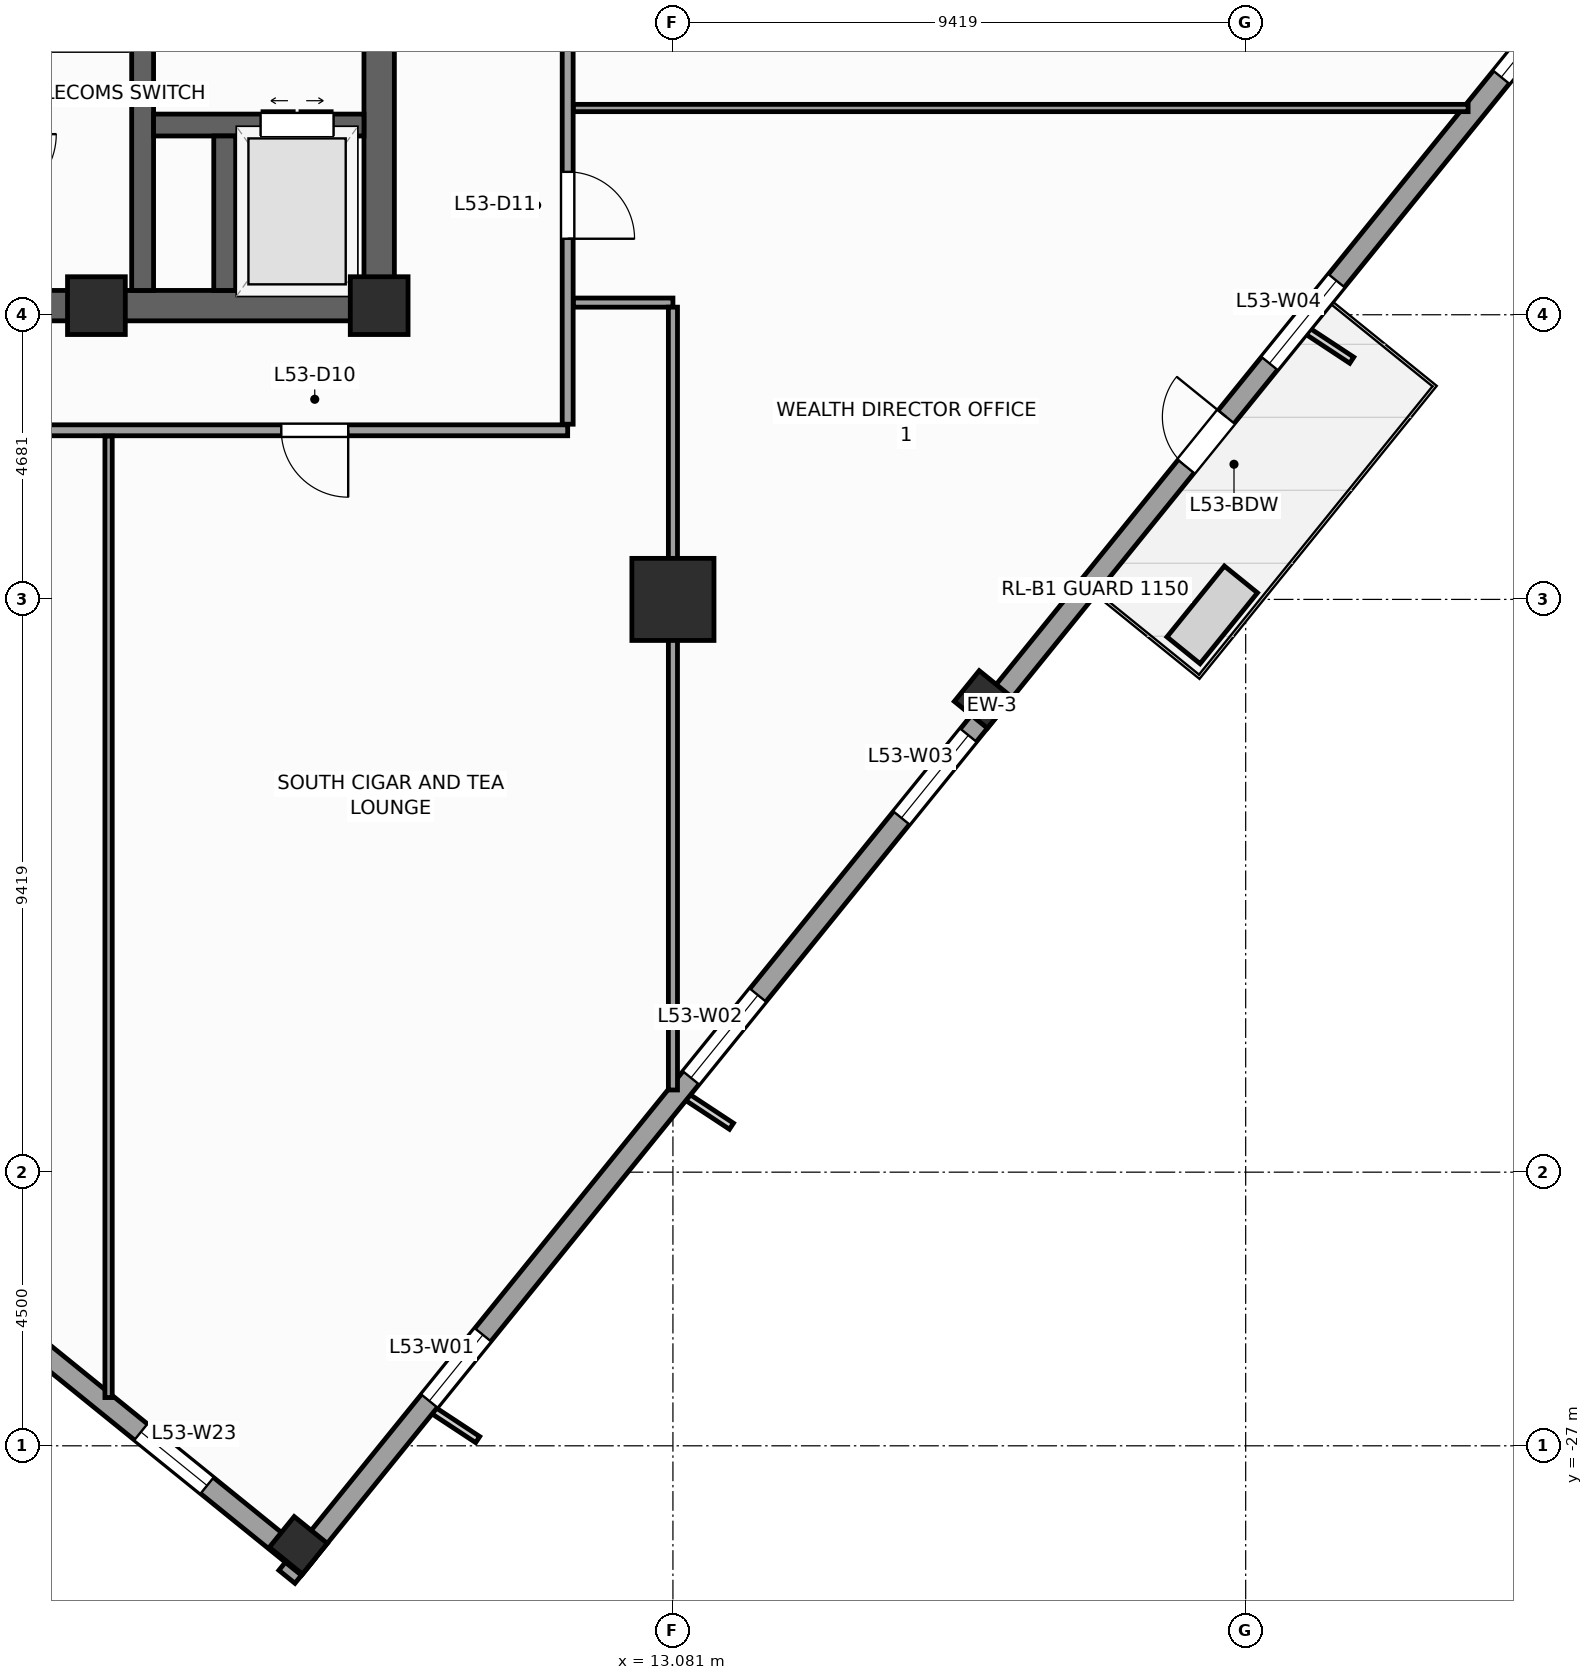
"""IFC4 building model, lengths in metres.
Left out: names, types, materials, properties, quantities, classifications, styles, units other than length and angle.
Written with IfcOpenShell. Run it as: python <this file> out.ifc"""

import sys

from ifc_helpers import new_model, si_unit, direction, frame, frame_2d, origin, origin_2d, place, context, subcontext, project, spatial, rectangle, extrude, source, transform, mapped, element, fill, save


model = new_model("IFC4")
c1 = context("Model", 3, precision=1e-05, world=origin(), true_north=direction((0.0, 1.0)))
c2 = subcontext(c1, "Body", "Model", "MODEL_VIEW")
j1 = project(units=[si_unit("LENGTHUNIT", "METRE"), si_unit("PLANEANGLEUNIT", "RADIAN")], contexts=[c1])
p1 = place(None, origin())
s1 = spatial("IfcSite", under=j1, at=p1, CompositionType="ELEMENT")
p2 = place(p1, origin())
s2 = spatial("IfcBuilding", under=s1, at=p2, CompositionType="ELEMENT")
p3 = place(p2, frame((0.0, 0.0, 221.2)))
s3 = spatial("IfcBuildingStorey", under=s2, at=p3, CompositionType="ELEMENT", Elevation=221.2)
p4 = place(p3, frame((-8.5, -8.25, 0.0), z_axis=(0.0, 0.0, 1.0), x_axis=(1.0, 0.0, 0.0)))
e1 = element("IfcWall", 1, at=p4, inside=s3, PredefinedType="SHEAR", context=c2, shape_type="SweptSolid", body=[
    extrude(rectangle(XDim=17.0, YDim=0.5, at=frame_2d((8.5, 0.0))), origin(), (0.0, 0.0, 1.0), 3.9),
])
p5 = place(p4, frame((7.85, 0.0, 0.0)))
e2 = element("IfcOpeningElement", 2, at=p5, cuts=e1, PredefinedType="OPENING", context=c2, shape_type="SweptSolid", body=[
    extrude(rectangle(XDim=1.3, YDim=2.2, at=frame_2d((0.65, 1.1))), frame((0.0, 0.26, 0.0), z_axis=(0.0, -1.0, 0.0), x_axis=(1.0, 0.0, 0.0)), (0.0, 0.0, 1.0), 0.52),
])
p6 = place(p3, frame((8.25, -8.0, 0.0), z_axis=(0.0, 0.0, 1.0), x_axis=(0.0, 1.0, 0.0)))
e3 = element("IfcWall", 3, at=p6, inside=s3, PredefinedType="SHEAR", context=c2, shape_type="SweptSolid", body=[
    extrude(rectangle(XDim=16.0, YDim=0.5, at=frame_2d((8.0, 0.0))), origin(), (0.0, 0.0, 1.0), 3.9),
])
p7 = place(p6, frame((4.69, 0.0, 0.0)))
e4 = element("IfcOpeningElement", 4, at=p7, cuts=e3, PredefinedType="OPENING", context=c2, shape_type="SweptSolid", body=[
    extrude(rectangle(XDim=1.3, YDim=2.2, at=frame_2d((0.65, 1.1))), frame((0.0, 0.26, 0.0), z_axis=(0.0, -1.0, 0.0), x_axis=(1.0, 0.0, 0.0)), (0.0, 0.0, 1.0), 0.52),
])
p8 = place(p3, frame((4.36, -8.0, 0.0), z_axis=(0.0, 0.0, 1.0), x_axis=(0.0, 1.0, 0.0)))
e5 = element("IfcWall", 5, at=p8, inside=s3, PredefinedType="SHEAR", context=c2, shape_type="SweptSolid", body=[
    extrude(rectangle(XDim=16.0, YDim=0.36, at=frame_2d((8.0, 0.0))), origin(), (0.0, 0.0, 1.0), 3.9),
])
p9 = place(p3, frame((4.54, -5.28, 0.0), z_axis=(0.0, 0.0, 1.0), x_axis=(1.0, 0.0, 0.0)))
e6 = element("IfcWall", 6, at=p9, inside=s3, PredefinedType="SHEAR", context=c2, shape_type="SweptSolid", body=[
    extrude(rectangle(XDim=3.46, YDim=0.36, at=frame_2d((1.73, 0.0))), origin(), (0.0, 0.0, 1.0), 3.9),
])
p10 = place(p9, frame((1.76, 0.0, 0.0)))
e7 = element("IfcOpeningElement", 7, at=p10, cuts=e6, PredefinedType="OPENING", context=c2, shape_type="SweptSolid", body=[
    extrude(rectangle(XDim=1.2, YDim=2.25, at=frame_2d((0.6, 1.125))), frame((0.0, 0.19, 0.0), z_axis=(0.0, -1.0, 0.0), x_axis=(1.0, 0.0, 0.0)), (0.0, 0.0, 1.0), 0.38),
])
p11 = place(p3, frame((5.71, -8.0, 0.0), z_axis=(0.0, 0.0, 1.0), x_axis=(0.0, 1.0, 0.0)))
e8 = element("IfcWall", 8, at=p11, inside=s3, PredefinedType="SHEAR", context=c2, shape_type="SweptSolid", body=[
    extrude(rectangle(XDim=2.54, YDim=0.36, at=frame_2d((1.27, 0.0))), origin(), (0.0, 0.0, 1.0), 3.9),
])
m1 = source(origin(), c2, "Body", "SweptSolid", [
    extrude(rectangle(XDim=0.95, YDim=0.95, at=origin_2d()), origin(), (0.0, 0.0, 1.0), 3.9),
])
for number, where, z_axis, x_axis in (
    (9, (8.25, -8.25, 0.0), (0.0, 0.0, 1.0), (1.0, 0.0, 0.0)),
    (10, (3.6, -8.25, 0.0), (0.0, 0.0, 1.0), (1.0, 0.0, 0.0)),
):
    element("IfcColumn", number, at=place(p3, frame(where, z_axis=z_axis, x_axis=x_axis)), inside=s3, PredefinedType="PILASTER", context=c2, shape_type="MappedRepresentation", body=[
        mapped(m1, transform((0.0, 0.0, 0.0), scale=1.0)),
    ])
m2 = source(origin(), c2, "Body", "SweptSolid", [
    extrude(rectangle(XDim=1.35, YDim=1.35, at=origin_2d()), origin(), (0.0, 0.0, 1.0), 3.9),
])
p12 = place(p3, frame((13.081, -13.081, 0.0), z_axis=(0.0, 0.0, 1.0), x_axis=(1.0, 0.0, 0.0)))
e11 = element("IfcColumn", 11, at=p12, inside=s3, PredefinedType="COLUMN", context=c2, shape_type="MappedRepresentation", body=[
    mapped(m2, transform((0.0, 0.0, 0.0), scale=1.0)),
])
m3 = source(origin(), c2, "Body", "SweptSolid", [
    extrude(rectangle(XDim=0.65, YDim=0.7, at=origin_2d()), origin(), (0.0, 0.0, 1.0), 3.9),
])
for number, where, z_axis, x_axis in (
    (12, (6.92, -28.637, 0.0), (0.0, 0.0, 1.0), (0.629, 0.777, 0.0)),
    (13, (18.185, -14.726, 0.0), (0.0, 0.0, 1.0), (0.629, 0.777, 0.0)),
):
    element("IfcColumn", number, at=place(p3, frame(where, z_axis=z_axis, x_axis=x_axis)), inside=s3, PredefinedType="COLUMN", context=c2, shape_type="MappedRepresentation", body=[
        mapped(m3, transform((0.0, 0.0, 0.0), scale=1.0)),
    ])
p13 = place(p3, frame((6.733, -29.154, 0.0), z_axis=(0.0, 0.0, 1.0), x_axis=(0.629325378072, 0.77714192302, 0.0)))
e14 = element("IfcWall", 14, at=p13, inside=s3, PredefinedType="STANDARD", context=c2, shape_type="SweptSolid", body=[
    extrude(rectangle(XDim=36.84, YDim=0.34, at=frame_2d((18.42, 0.0))), origin(), (0.0, 0.0, 1.0), 2.96),
])
p14 = place(p13, frame((23.495, 0.0, 0.0)))
e15 = element("IfcOpeningElement", 15, at=p14, cuts=e14, PredefinedType="OPENING", context=c2, shape_type="SweptSolid", body=[
    extrude(rectangle(XDim=1.05, YDim=2.25, at=frame_2d((0.525, 1.125))), frame((0.0, 0.18, 0.0), z_axis=(0.0, -1.0, 0.0), x_axis=(1.0, 0.0, 0.0)), (0.0, 0.0, 1.0), 0.36),
])
p15 = place(p13, frame((3.721, 0.0, 0.48)))
e16 = element("IfcOpeningElement", 16, at=p15, cuts=e14, PredefinedType="OPENING", context=c2, shape_type="SweptSolid", body=[
    extrude(rectangle(XDim=1.4, YDim=2.4, at=frame_2d((0.7, 1.2))), frame((0.0, 0.18, 0.0), z_axis=(0.0, -1.0, 0.0), x_axis=(1.0, 0.0, 0.0)), (0.0, 0.0, 1.0), 0.36),
])
p16 = place(p13, frame((10.559, 0.0, 0.58)))
e17 = element("IfcOpeningElement", 17, at=p16, cuts=e14, PredefinedType="OPENING", context=c2, shape_type="SweptSolid", body=[
    extrude(rectangle(XDim=1.75, YDim=2.3, at=frame_2d((0.875, 1.15))), frame((0.0, 0.18, 0.0), z_axis=(0.0, -1.0, 0.0), x_axis=(1.0, 0.0, 0.0)), (0.0, 0.0, 1.0), 0.36),
])
p17 = place(p13, frame((16.058, 0.0, 0.58)))
e18 = element("IfcOpeningElement", 18, at=p17, cuts=e14, PredefinedType="OPENING", context=c2, shape_type="SweptSolid", body=[
    extrude(rectangle(XDim=1.75, YDim=2.3, at=frame_2d((0.875, 1.15))), frame((0.0, 0.18, 0.0), z_axis=(0.0, -1.0, 0.0), x_axis=(1.0, 0.0, 0.0)), (0.0, 0.0, 1.0), 0.36),
])
p18 = place(p13, frame((25.676, 0.0, 0.58)))
e19 = element("IfcOpeningElement", 19, at=p18, cuts=e14, PredefinedType="OPENING", context=c2, shape_type="SweptSolid", body=[
    extrude(rectangle(XDim=1.75, YDim=2.3, at=frame_2d((0.875, 1.15))), frame((0.0, 0.18, 0.0), z_axis=(0.0, -1.0, 0.0), x_axis=(1.0, 0.0, 0.0)), (0.0, 0.0, 1.0), 0.36),
])
p19 = place(p13, frame((31.732, 0.0, 0.48)))
e20 = element("IfcOpeningElement", 20, at=p19, cuts=e14, PredefinedType="OPENING", context=c2, shape_type="SweptSolid", body=[
    extrude(rectangle(XDim=1.4, YDim=2.4, at=frame_2d((0.7, 1.2))), frame((0.0, 0.18, 0.0), z_axis=(0.0, -1.0, 0.0), x_axis=(1.0, 0.0, 0.0)), (0.0, 0.0, 1.0), 0.36),
])
p20 = place(p3, frame((2.673, -25.429, 0.0), z_axis=(0.0, 0.0, 1.0), x_axis=(0.777162640055, -0.629299794138, 0.0)))
e21 = element("IfcWall", 21, at=p20, inside=s3, PredefinedType="STANDARD", context=c2, shape_type="SweptSolid", body=[
    extrude(rectangle(XDim=5.67, YDim=0.34, at=frame_2d((2.835, 0.0))), origin(), (0.0, 0.0, 1.0), 3.66),
])
p21 = place(p20, frame((2.135, 0.0, 0.48)))
e22 = element("IfcOpeningElement", 22, at=p21, cuts=e21, PredefinedType="OPENING", context=c2, shape_type="SweptSolid", body=[
    extrude(rectangle(XDim=1.4, YDim=2.4, at=frame_2d((0.7, 1.2))), frame((0.0, 0.18, 0.0), z_axis=(0.0, -1.0, 0.0), x_axis=(1.0, 0.0, 0.0)), (0.0, 0.0, 1.0), 0.36),
])
p22 = place(p3, frame((-11.4, -10.3, 0.0), z_axis=(0.0, 0.0, 1.0), x_axis=(1.0, 0.0, 0.0)))
e23 = element("IfcWall", 23, at=p22, inside=s3, PredefinedType="PARTITIONING", context=c2, shape_type="SweptSolid", body=[
    extrude(rectangle(XDim=22.75, YDim=0.18, at=frame_2d((11.375, 0.0))), origin(), (0.0, 0.0, 1.0), 3.66),
])
p23 = place(p22, frame((8.436, 0.0, 0.0)))
e24 = element("IfcOpeningElement", 24, at=p23, cuts=e23, PredefinedType="OPENING", context=c2, shape_type="SweptSolid", body=[
    extrude(rectangle(XDim=0.95, YDim=2.1, at=frame_2d((0.475, 1.05))), frame((0.0, 0.1, 0.0), z_axis=(0.0, -1.0, 0.0), x_axis=(1.0, 0.0, 0.0)), (0.0, 0.0, 1.0), 0.2),
])
p24 = place(p22, frame((1.58, 0.0, 0.0)))
e25 = element("IfcOpeningElement", 25, at=p24, cuts=e23, PredefinedType="OPENING", context=c2, shape_type="SweptSolid", body=[
    extrude(rectangle(XDim=0.95, YDim=2.1, at=frame_2d((0.475, 1.05))), frame((0.0, 0.1, 0.0), z_axis=(0.0, -1.0, 0.0), x_axis=(1.0, 0.0, 0.0)), (0.0, 0.0, 1.0), 0.2),
])
p25 = place(p22, frame((4.834, 0.0, 0.0)))
e26 = element("IfcOpeningElement", 26, at=p25, cuts=e23, PredefinedType="OPENING", context=c2, shape_type="SweptSolid", body=[
    extrude(rectangle(XDim=1.1, YDim=2.2, at=frame_2d((0.55, 1.1))), frame((0.0, 0.1, 0.0), z_axis=(0.0, -1.0, 0.0), x_axis=(1.0, 0.0, 0.0)), (0.0, 0.0, 1.0), 0.2),
])
p26 = place(p22, frame((12.0, 0.0, 0.0)))
e27 = element("IfcOpeningElement", 27, at=p26, cuts=e23, PredefinedType="OPENING", context=c2, shape_type="SweptSolid", body=[
    extrude(rectangle(XDim=1.1, YDim=2.2, at=frame_2d((0.55, 1.1))), frame((0.0, 0.1, 0.0), z_axis=(0.0, -1.0, 0.0), x_axis=(1.0, 0.0, 0.0)), (0.0, 0.0, 1.0), 0.2),
])
p27 = place(p22, frame((18.041, 0.0, 0.0)))
e28 = element("IfcOpeningElement", 28, at=p27, cuts=e23, PredefinedType="OPENING", context=c2, shape_type="SweptSolid", body=[
    extrude(rectangle(XDim=1.1, YDim=2.2, at=frame_2d((0.55, 1.1))), frame((0.0, 0.1, 0.0), z_axis=(0.0, -1.0, 0.0), x_axis=(1.0, 0.0, 0.0)), (0.0, 0.0, 1.0), 0.2),
])
p28 = place(p3, frame((11.35, -10.2, 0.0), z_axis=(0.0, 0.0, 1.0), x_axis=(0.0, 1.0, 0.0)))
e29 = element("IfcWall", 29, at=p28, inside=s3, PredefinedType="PARTITIONING", context=c2, shape_type="SweptSolid", body=[
    extrude(rectangle(XDim=8.8, YDim=0.18, at=frame_2d((4.4, 0.0))), origin(), (0.0, 0.0, 1.0), 3.66),
])
p29 = place(p28, frame((3.05, 0.0, 0.0)))
e30 = element("IfcOpeningElement", 30, at=p29, cuts=e29, PredefinedType="OPENING", context=c2, shape_type="SweptSolid", body=[
    extrude(rectangle(XDim=1.1, YDim=2.2, at=frame_2d((0.55, 1.1))), frame((0.0, 0.1, 0.0), z_axis=(0.0, -1.0, 0.0), x_axis=(1.0, 0.0, 0.0)), (0.0, 0.0, 1.0), 0.2),
])
p30 = place(p28, frame((6.286, 0.0, 0.0)))
e31 = element("IfcOpeningElement", 31, at=p30, cuts=e29, PredefinedType="OPENING", context=c2, shape_type="SweptSolid", body=[
    extrude(rectangle(XDim=1.1, YDim=2.2, at=frame_2d((0.55, 1.1))), frame((0.0, 0.1, 0.0), z_axis=(0.0, -1.0, 0.0), x_axis=(1.0, 0.0, 0.0)), (0.0, 0.0, 1.0), 0.2),
])
p31 = place(p3, frame((3.8, -26.207, 0.0), z_axis=(0.0, 0.0, 1.0), x_axis=(0.0, 1.0, 0.0)))
e32 = element("IfcWall", 32, at=p31, inside=s3, PredefinedType="PARTITIONING", context=c2, shape_type="SweptSolid", body=[
    extrude(rectangle(XDim=15.812, YDim=0.12, at=frame_2d((7.906, 0.0))), origin(), (0.0, 0.0, 1.0), 3.66),
])
p32 = place(p3, frame((11.445, -8.2, 0.0), z_axis=(0.0, 0.0, 1.0), x_axis=(1.0, 0.0, 0.0)))
e33 = element("IfcWall", 33, at=p32, inside=s3, PredefinedType="PARTITIONING", context=c2, shape_type="SweptSolid", body=[
    extrude(rectangle(XDim=1.636, YDim=0.15, at=frame_2d((0.818, 0.0))), origin(), (0.0, 0.0, 1.0), 3.66),
])
p33 = place(p3, frame((13.081, -8.275, 0.0), z_axis=(0.0, 0.0, 1.0), x_axis=(0.0, -1.0, 0.0)))
e34 = element("IfcWall", 34, at=p33, inside=s3, PredefinedType="PARTITIONING", context=c2, shape_type="SweptSolid", body=[
    extrude(rectangle(XDim=12.874, YDim=0.15, at=frame_2d((6.437, 0.0))), origin(), (0.0, 0.0, 1.0), 2.76),
])
p34 = place(p3, frame((11.445, -5.0, 0.0), z_axis=(0.0, 0.0, 1.0), x_axis=(1.0, 0.0, 0.0)))
e35 = element("IfcWall", 35, at=p34, inside=s3, PredefinedType="PARTITIONING", context=c2, shape_type="SweptSolid", body=[
    extrude(rectangle(XDim=14.713, YDim=0.12, at=frame_2d((7.356, 0.0))), origin(), (0.0, 0.0, 1.0), 3.66),
])
m4 = source(origin(), c2, "Body", "SweptSolid", [
    extrude(rectangle(XDim=1.05, YDim=2.25, at=frame_2d((0.525, 1.125))), frame((0.0, 0.025, 0.0), z_axis=(0.0, -1.0, 0.0), x_axis=(1.0, 0.0, 0.0)), (0.0, 0.0, 1.0), 0.05),
])
p35 = place(p14, origin())
e36 = element("IfcDoor", 36, at=p35, inside=s3, OperationType="SINGLE_SWING_RIGHT", PredefinedType="DOOR", context=c2, shape_type="MappedRepresentation", body=[
    mapped(m4, transform((0.0, 0.0, 0.0), scale=1.0)),
])
fill(e15, e36)
m5 = source(origin(), c2, "Body", "SweptSolid", [
    extrude(rectangle(XDim=1.4, YDim=2.4, at=frame_2d((0.7, 1.2))), frame((0.0, 0.03, 0.0), z_axis=(0.0, -1.0, 0.0), x_axis=(1.0, 0.0, 0.0)), (0.0, 0.0, 1.0), 0.06),
])
p36 = place(p15, origin())
e37 = element("IfcWindow", 37, at=p36, inside=s3, PartitioningType="SINGLE_PANEL", PredefinedType="WINDOW", context=c2, shape_type="MappedRepresentation", body=[
    mapped(m5, transform((0.0, 0.0, 0.0), scale=1.0)),
])
fill(e16, e37)
m6 = source(origin(), c2, "Body", "SweptSolid", [
    extrude(rectangle(XDim=1.75, YDim=2.3, at=frame_2d((0.875, 1.15))), frame((0.0, 0.03, 0.0), z_axis=(0.0, -1.0, 0.0), x_axis=(1.0, 0.0, 0.0)), (0.0, 0.0, 1.0), 0.06),
])
p37 = place(p16, origin())
e38 = element("IfcWindow", 38, at=p37, inside=s3, PartitioningType="SINGLE_PANEL", PredefinedType="WINDOW", context=c2, shape_type="MappedRepresentation", body=[
    mapped(m6, transform((0.0, 0.0, 0.0), scale=1.0)),
])
fill(e17, e38)
p38 = place(p17, origin())
e39 = element("IfcWindow", 39, at=p38, inside=s3, PartitioningType="SINGLE_PANEL", PredefinedType="WINDOW", context=c2, shape_type="MappedRepresentation", body=[
    mapped(m6, transform((0.0, 0.0, 0.0), scale=1.0)),
])
fill(e18, e39)
p39 = place(p18, origin())
e40 = element("IfcWindow", 40, at=p39, inside=s3, PartitioningType="SINGLE_PANEL", PredefinedType="WINDOW", context=c2, shape_type="MappedRepresentation", body=[
    mapped(m6, transform((0.0, 0.0, 0.0), scale=1.0)),
])
fill(e19, e40)
p40 = place(p19, origin())
e41 = element("IfcWindow", 41, at=p40, inside=s3, PartitioningType="SINGLE_PANEL", PredefinedType="WINDOW", context=c2, shape_type="MappedRepresentation", body=[
    mapped(m5, transform((0.0, 0.0, 0.0), scale=1.0)),
])
fill(e20, e41)
p41 = place(p21, origin())
e42 = element("IfcWindow", 42, at=p41, inside=s3, PartitioningType="SINGLE_PANEL", PredefinedType="WINDOW", context=c2, shape_type="MappedRepresentation", body=[
    mapped(m5, transform((0.0, 0.0, 0.0), scale=1.0)),
])
fill(e22, e42)
m7 = source(origin(), c2, "Body", "SweptSolid", [
    extrude(rectangle(XDim=1.2, YDim=2.25, at=frame_2d((0.6, 1.125))), frame((0.0, 0.025, 0.0), z_axis=(0.0, -1.0, 0.0), x_axis=(1.0, 0.0, 0.0)), (0.0, 0.0, 1.0), 0.05),
])
p42 = place(p10, origin())
e43 = element("IfcDoor", 43, at=p42, inside=s3, OperationType="DOUBLE_DOOR_SLIDING", PredefinedType="DOOR", context=c2, shape_type="MappedRepresentation", body=[
    mapped(m7, transform((0.0, 0.0, 0.0), scale=1.0)),
])
fill(e7, e43)
m8 = source(origin(), c2, "Body", "SweptSolid", [
    extrude(rectangle(XDim=1.1, YDim=2.2, at=frame_2d((0.55, 1.1))), frame((0.0, 0.025, 0.0), z_axis=(0.0, -1.0, 0.0), x_axis=(1.0, 0.0, 0.0)), (0.0, 0.0, 1.0), 0.05),
])
p43 = place(p27, frame((1.1, 0.0, 0.0), z_axis=(0.0, 0.0, 1.0), x_axis=(-1.0, 0.0, 0.0)))
e44 = element("IfcDoor", 44, at=p43, inside=s3, OperationType="SINGLE_SWING_RIGHT", PredefinedType="DOOR", context=c2, shape_type="MappedRepresentation", body=[
    mapped(m8, transform((0.0, 0.0, 0.0), scale=1.0)),
])
fill(e28, e44)
p44 = place(p29, frame((1.1, 0.0, 0.0), z_axis=(0.0, 0.0, 1.0), x_axis=(-1.0, 0.0, 0.0)))
e45 = element("IfcDoor", 45, at=p44, inside=s3, OperationType="SINGLE_SWING_LEFT", PredefinedType="DOOR", context=c2, shape_type="MappedRepresentation", body=[
    mapped(m8, transform((0.0, 0.0, 0.0), scale=1.0)),
])
fill(e30, e45)
save(model, sys.argv[1])
